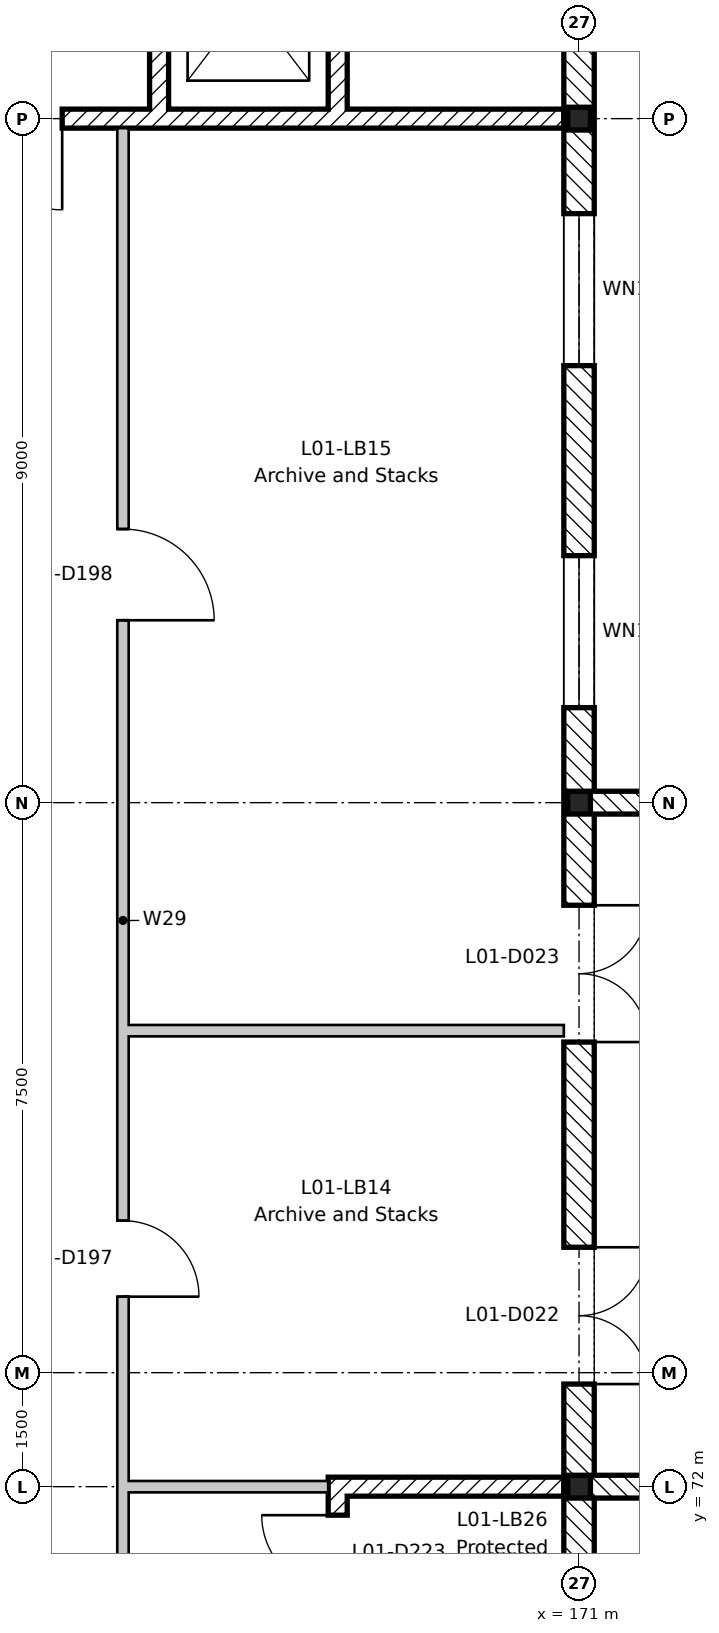
"""IFC4 building model, lengths in metres.
Left out: names, types, materials, properties, quantities, classifications, styles, units other than length and angle.
Written with IfcOpenShell. Run it as: python <this file> out.ifc"""

import sys

from ifc_helpers import new_model, si_unit, direction, frame, frame_2d, origin, origin_2d, place, context, subcontext, project, spatial, rectangle, i_section, extrude, element, fill, save


model = new_model("IFC4")
c1 = context("Model", 3, precision=1e-05, world=origin(), true_north=direction((0.0, 1.0)))
c2 = subcontext(c1, "Body", "Model", "MODEL_VIEW")
j1 = project(units=[si_unit("LENGTHUNIT", "METRE"), si_unit("PLANEANGLEUNIT", "RADIAN")], contexts=[c1])
p1 = place(None, origin())
s1 = spatial("IfcSite", under=j1, at=p1, CompositionType="ELEMENT")
p2 = place(p1, origin())
s2 = spatial("IfcBuilding", under=s1, at=p2, CompositionType="ELEMENT")
p3 = place(p2, frame((0.0, 0.0, 5.4)))
s3 = spatial("IfcBuildingStorey", under=s2, at=p3, CompositionType="ELEMENT", Elevation=5.4)
for number, where, z_axis, x_axis in (
    (1, (171.0, 72.0, -0.2), (0.0, 0.0, 1.0), (1.0, 0.0, 0.0)),
    (2, (171.0, 81.0, -0.2), (0.0, 0.0, 1.0), (1.0, 0.0, 0.0)),
    (3, (171.0, 90.0, -0.2), (0.0, 0.0, 1.0), (1.0, 0.0, 0.0)),
):
    element("IfcColumn", number, at=place(p3, frame(where, z_axis=z_axis, x_axis=x_axis)), inside=s3, PredefinedType="COLUMN", context=c2, shape_type="SweptSolid", body=[
        extrude(i_section(OverallWidth=0.3, OverallDepth=0.3, WebThickness=0.011, FlangeThickness=0.019, FilletRadius=0.027, at=origin_2d()), origin(), (0.0, 0.0, 1.0), 4.5),
    ])
p4 = place(p3, frame((167.825, 98.8, 0.0), z_axis=(0.0, 0.0, 1.0), x_axis=(0.0, -1.0, 0.0)))
e4 = element("IfcWall", 4, at=p4, inside=s3, PredefinedType="SHEAR", context=c2, shape_type="SweptSolid", body=[
    extrude(rectangle(XDim=8.675, YDim=0.25, at=frame_2d((4.337, 0.0))), origin(), (0.0, 0.0, 1.0), 4.3),
])
p5 = place(p4, frame((0.25, 0.0, 0.0)))
e5 = element("IfcOpeningElement", 5, at=p5, cuts=e4, PredefinedType="OPENING", context=c2, shape_type="SweptSolid", body=[
    extrude(rectangle(XDim=1.0, YDim=2.1, at=frame_2d((0.5, 1.05))), frame((0.0, 0.135, 0.0), z_axis=(0.0, -1.0, 0.0), x_axis=(1.0, 0.0, 0.0)), (0.0, 0.0, 1.0), 0.27),
])
p6 = place(p3, frame((170.8, 90.0, 0.0), z_axis=(0.0, 0.0, 1.0), x_axis=(-1.0, 0.0, 0.0)))
e6 = element("IfcWall", 6, at=p6, inside=s3, PredefinedType="SHEAR", context=c2, shape_type="SweptSolid", body=[
    extrude(rectangle(XDim=8.65, YDim=0.25, at=frame_2d((4.325, 0.0))), origin(), (0.0, 0.0, 1.0), 4.3),
])
p7 = place(p6, frame((6.6, 0.0, 0.0)))
e7 = element("IfcOpeningElement", 7, at=p7, cuts=e6, PredefinedType="OPENING", context=c2, shape_type="SweptSolid", body=[
    extrude(rectangle(XDim=1.2, YDim=2.1, at=frame_2d((0.6, 1.05))), frame((0.0, 0.135, 0.0), z_axis=(0.0, -1.0, 0.0), x_axis=(1.0, 0.0, 0.0)), (0.0, 0.0, 1.0), 0.27),
])
p8 = place(p3, frame((165.475, 92.725, 0.0), z_axis=(0.0, 0.0, 1.0), x_axis=(0.0, -1.0, 0.0)))
e8 = element("IfcWall", 8, at=p8, inside=s3, PredefinedType="SHEAR", context=c2, shape_type="SweptSolid", body=[
    extrude(rectangle(XDim=2.6, YDim=0.25, at=frame_2d((1.3, 0.0))), origin(), (0.0, 0.0, 1.0), 4.3),
])
p9 = place(p3, frame((167.825, 71.875, 0.0), z_axis=(0.0, 0.0, 1.0), x_axis=(0.0, -1.0, 0.0)))
e9 = element("IfcWall", 9, at=p9, inside=s3, PredefinedType="SHEAR", context=c2, shape_type="SweptSolid", body=[
    extrude(rectangle(XDim=8.675, YDim=0.25, at=frame_2d((4.337, 0.0))), origin(), (0.0, 0.0, 1.0), 4.3),
])
p10 = place(p9, frame((0.25, 0.0, 0.0)))
e10 = element("IfcOpeningElement", 10, at=p10, cuts=e9, PredefinedType="OPENING", context=c2, shape_type="SweptSolid", body=[
    extrude(rectangle(XDim=1.0, YDim=2.1, at=frame_2d((0.5, 1.05))), frame((0.0, 0.135, 0.0), z_axis=(0.0, -1.0, 0.0), x_axis=(1.0, 0.0, 0.0)), (0.0, 0.0, 1.0), 0.27),
])
p11 = place(p3, frame((170.8, 72.0, 0.0), z_axis=(0.0, 0.0, 1.0), x_axis=(-1.0, 0.0, 0.0)))
e11 = element("IfcWall", 11, at=p11, inside=s3, PredefinedType="SHEAR", context=c2, shape_type="SweptSolid", body=[
    extrude(rectangle(XDim=3.1, YDim=0.25, at=frame_2d((1.55, 0.0))), origin(), (0.0, 0.0, 1.0), 3.8),
])
for number, where, z_axis, x_axis in (
    (12, (171.15, 72.0, 0.0), (0.0, 0.0, 1.0), (1.0, 0.0, 0.0)),
    (13, (171.15, 81.0, 0.0), (0.0, 0.0, 1.0), (1.0, 0.0, 0.0)),
):
    element("IfcWall", number, at=place(p3, frame(where, z_axis=z_axis, x_axis=x_axis)), inside=s3, PredefinedType="STANDARD", context=c2, shape_type="SweptSolid", body=[
        extrude(rectangle(XDim=2.85, YDim=0.3, at=frame_2d((1.425, 0.0))), origin(), (0.0, 0.0, 1.0), 3.97),
    ])
p12 = place(p3, frame((171.0, 63.2, 0.0), z_axis=(0.0, 0.0, 1.0), x_axis=(0.0, 1.0, 0.0)))
e14 = element("IfcWall", 14, at=p12, inside=s3, PredefinedType="STANDARD", context=c2, shape_type="SweptSolid", body=[
    extrude(rectangle(XDim=35.6, YDim=0.4, at=frame_2d((17.8, 0.0))), origin(), (0.0, 0.0, 1.0), 4.3),
])
p13 = place(p12, frame((1.05, 0.0, 0.5)))
e15 = element("IfcOpeningElement", 15, at=p13, cuts=e14, PredefinedType="OPENING", context=c2, shape_type="SweptSolid", body=[
    extrude(rectangle(XDim=2.0, YDim=3.2, at=frame_2d((1.0, 1.6))), frame((0.0, 0.21, 0.0), z_axis=(0.0, -1.0, 0.0), x_axis=(1.0, 0.0, 0.0)), (0.0, 0.0, 1.0), 0.42),
])
p14 = place(p12, frame((5.55, 0.0, 0.5)))
e16 = element("IfcOpeningElement", 16, at=p14, cuts=e14, PredefinedType="OPENING", context=c2, shape_type="SweptSolid", body=[
    extrude(rectangle(XDim=2.0, YDim=3.2, at=frame_2d((1.0, 1.6))), frame((0.0, 0.21, 0.0), z_axis=(0.0, -1.0, 0.0), x_axis=(1.0, 0.0, 0.0)), (0.0, 0.0, 1.0), 0.42),
])
p15 = place(p12, frame((19.05, 0.0, 0.5)))
e17 = element("IfcOpeningElement", 17, at=p15, cuts=e14, PredefinedType="OPENING", context=c2, shape_type="SweptSolid", body=[
    extrude(rectangle(XDim=2.0, YDim=3.2, at=frame_2d((1.0, 1.6))), frame((0.0, 0.21, 0.0), z_axis=(0.0, -1.0, 0.0), x_axis=(1.0, 0.0, 0.0)), (0.0, 0.0, 1.0), 0.42),
])
p16 = place(p12, frame((23.55, 0.0, 0.5)))
e18 = element("IfcOpeningElement", 18, at=p16, cuts=e14, PredefinedType="OPENING", context=c2, shape_type="SweptSolid", body=[
    extrude(rectangle(XDim=2.0, YDim=3.2, at=frame_2d((1.0, 1.6))), frame((0.0, 0.21, 0.0), z_axis=(0.0, -1.0, 0.0), x_axis=(1.0, 0.0, 0.0)), (0.0, 0.0, 1.0), 0.42),
])
p17 = place(p12, frame((10.15, 0.0, 0.0)))
e19 = element("IfcOpeningElement", 19, at=p17, cuts=e14, PredefinedType="OPENING", context=c2, shape_type="SweptSolid", body=[
    extrude(rectangle(XDim=1.8, YDim=2.4, at=frame_2d((0.9, 1.2))), frame((0.0, 0.21, 0.0), z_axis=(0.0, -1.0, 0.0), x_axis=(1.0, 0.0, 0.0)), (0.0, 0.0, 1.0), 0.42),
])
p18 = place(p12, frame((14.65, 0.0, 0.0)))
e20 = element("IfcOpeningElement", 20, at=p18, cuts=e14, PredefinedType="OPENING", context=c2, shape_type="SweptSolid", body=[
    extrude(rectangle(XDim=1.8, YDim=2.4, at=frame_2d((0.9, 1.2))), frame((0.0, 0.21, 0.0), z_axis=(0.0, -1.0, 0.0), x_axis=(1.0, 0.0, 0.0)), (0.0, 0.0, 1.0), 0.42),
])
p19 = place(p3, frame((165.075, 72.0, 0.0), z_axis=(0.0, 0.0, 1.0), x_axis=(1.0, 0.0, 0.0)))
e21 = element("IfcWall", 21, at=p19, inside=s3, PredefinedType="PARTITIONING", context=c2, shape_type="SweptSolid", body=[
    extrude(rectangle(XDim=2.625, YDim=0.15, at=frame_2d((1.312, 0.0))), origin(), (0.0, 0.0, 1.0), 3.78),
])
p20 = place(p3, frame((165.075, 78.0, 0.0), z_axis=(0.0, 0.0, 1.0), x_axis=(1.0, 0.0, 0.0)))
e22 = element("IfcWall", 22, at=p20, inside=s3, PredefinedType="PARTITIONING", context=c2, shape_type="SweptSolid", body=[
    extrude(rectangle(XDim=5.725, YDim=0.15, at=frame_2d((2.863, 0.0))), origin(), (0.0, 0.0, 1.0), 3.78),
])
p21 = place(p3, frame((165.0, 69.075, 0.0), z_axis=(0.0, 0.0, 1.0), x_axis=(0.0, 1.0, 0.0)))
e23 = element("IfcWall", 23, at=p21, inside=s3, PredefinedType="PARTITIONING", context=c2, shape_type="SweptSolid", body=[
    extrude(rectangle(XDim=20.8, YDim=0.15, at=frame_2d((10.4, 0.0))), origin(), (0.0, 0.0, 1.0), 3.78),
])
p22 = place(p21, frame((0.825, 0.0, 0.0)))
e24 = element("IfcOpeningElement", 24, at=p22, cuts=e23, PredefinedType="OPENING", context=c2, shape_type="SweptSolid", body=[
    extrude(rectangle(XDim=1.2, YDim=2.1, at=frame_2d((0.6, 1.05))), frame((0.0, 0.085, 0.0), z_axis=(0.0, -1.0, 0.0), x_axis=(1.0, 0.0, 0.0)), (0.0, 0.0, 1.0), 0.17),
])
p23 = place(p21, frame((5.425, 0.0, 0.0)))
e25 = element("IfcOpeningElement", 25, at=p23, cuts=e23, PredefinedType="OPENING", context=c2, shape_type="SweptSolid", body=[
    extrude(rectangle(XDim=1.0, YDim=2.1, at=frame_2d((0.5, 1.05))), frame((0.0, 0.085, 0.0), z_axis=(0.0, -1.0, 0.0), x_axis=(1.0, 0.0, 0.0)), (0.0, 0.0, 1.0), 0.17),
])
p24 = place(p21, frame((14.325, 0.0, 0.0)))
e26 = element("IfcOpeningElement", 26, at=p24, cuts=e23, PredefinedType="OPENING", context=c2, shape_type="SweptSolid", body=[
    extrude(rectangle(XDim=1.2, YDim=2.1, at=frame_2d((0.6, 1.05))), frame((0.0, 0.085, 0.0), z_axis=(0.0, -1.0, 0.0), x_axis=(1.0, 0.0, 0.0)), (0.0, 0.0, 1.0), 0.17),
])
p25 = place(p15, origin())
e27 = element("IfcWindow", 27, at=p25, inside=s3, PartitioningType="SINGLE_PANEL", PredefinedType="WINDOW", context=c2, shape_type="SweptSolid", body=[
    extrude(rectangle(XDim=2.0, YDim=3.2, at=frame_2d((1.0, 1.6))), frame((0.0, 0.03, 0.0), z_axis=(0.0, -1.0, 0.0), x_axis=(1.0, 0.0, 0.0)), (0.0, 0.0, 1.0), 0.06),
])
fill(e17, e27)
p26 = place(p16, origin())
e28 = element("IfcWindow", 28, at=p26, inside=s3, PartitioningType="SINGLE_PANEL", PredefinedType="WINDOW", context=c2, shape_type="SweptSolid", body=[
    extrude(rectangle(XDim=2.0, YDim=3.2, at=frame_2d((1.0, 1.6))), frame((0.0, 0.03, 0.0), z_axis=(0.0, -1.0, 0.0), x_axis=(1.0, 0.0, 0.0)), (0.0, 0.0, 1.0), 0.06),
])
fill(e18, e28)
p27 = place(p17, frame((1.8, 0.0, 0.0), z_axis=(0.0, 0.0, 1.0), x_axis=(-1.0, 0.0, 0.0)))
e29 = element("IfcDoor", 29, at=p27, inside=s3, OperationType="DOUBLE_DOOR_SINGLE_SWING", PredefinedType="DOOR", context=c2, shape_type="SweptSolid", body=[
    extrude(rectangle(XDim=1.8, YDim=2.4, at=frame_2d((0.9, 1.2))), frame((0.0, 0.025, 0.0), z_axis=(0.0, -1.0, 0.0), x_axis=(1.0, 0.0, 0.0)), (0.0, 0.0, 1.0), 0.05),
])
fill(e19, e29)
p28 = place(p18, frame((1.8, 0.0, 0.0), z_axis=(0.0, 0.0, 1.0), x_axis=(-1.0, 0.0, 0.0)))
e30 = element("IfcDoor", 30, at=p28, inside=s3, OperationType="DOUBLE_DOOR_SINGLE_SWING", PredefinedType="DOOR", context=c2, shape_type="SweptSolid", body=[
    extrude(rectangle(XDim=1.8, YDim=2.4, at=frame_2d((0.9, 1.2))), frame((0.0, 0.025, 0.0), z_axis=(0.0, -1.0, 0.0), x_axis=(1.0, 0.0, 0.0)), (0.0, 0.0, 1.0), 0.05),
])
fill(e20, e30)
p29 = place(p23, frame((1.0, 0.0, 0.0), z_axis=(0.0, 0.0, 1.0), x_axis=(-1.0, 0.0, 0.0)))
e31 = element("IfcDoor", 31, at=p29, inside=s3, OperationType="SINGLE_SWING_RIGHT", PredefinedType="DOOR", context=c2, shape_type="SweptSolid", body=[
    extrude(rectangle(XDim=1.0, YDim=2.1, at=frame_2d((0.5, 1.05))), frame((0.0, 0.025, 0.0), z_axis=(0.0, -1.0, 0.0), x_axis=(1.0, 0.0, 0.0)), (0.0, 0.0, 1.0), 0.05),
])
fill(e25, e31)
p30 = place(p24, frame((1.2, 0.0, 0.0), z_axis=(0.0, 0.0, 1.0), x_axis=(-1.0, 0.0, 0.0)))
e32 = element("IfcDoor", 32, at=p30, inside=s3, OperationType="SINGLE_SWING_RIGHT", PredefinedType="DOOR", context=c2, shape_type="SweptSolid", body=[
    extrude(rectangle(XDim=1.2, YDim=2.1, at=frame_2d((0.6, 1.05))), frame((0.0, 0.025, 0.0), z_axis=(0.0, -1.0, 0.0), x_axis=(1.0, 0.0, 0.0)), (0.0, 0.0, 1.0), 0.05),
])
fill(e26, e32)
p31 = place(p7, origin())
e33 = element("IfcDoor", 33, at=p31, inside=s3, OperationType="SINGLE_SWING_LEFT", PredefinedType="DOOR", context=c2, shape_type="SweptSolid", body=[
    extrude(rectangle(XDim=1.2, YDim=2.1, at=frame_2d((0.6, 1.05))), frame((0.0, 0.025, 0.0), z_axis=(0.0, -1.0, 0.0), x_axis=(1.0, 0.0, 0.0)), (0.0, 0.0, 1.0), 0.05),
])
fill(e7, e33)
p32 = place(p10, frame((1.0, 0.0, 0.0), z_axis=(0.0, 0.0, 1.0), x_axis=(-1.0, 0.0, 0.0)))
e34 = element("IfcDoor", 34, at=p32, inside=s3, OperationType="SINGLE_SWING_RIGHT", PredefinedType="DOOR", context=c2, shape_type="SweptSolid", body=[
    extrude(rectangle(XDim=1.0, YDim=2.1, at=frame_2d((0.5, 1.05))), frame((0.0, 0.025, 0.0), z_axis=(0.0, -1.0, 0.0), x_axis=(1.0, 0.0, 0.0)), (0.0, 0.0, 1.0), 0.05),
])
fill(e10, e34)
save(model, sys.argv[1])
